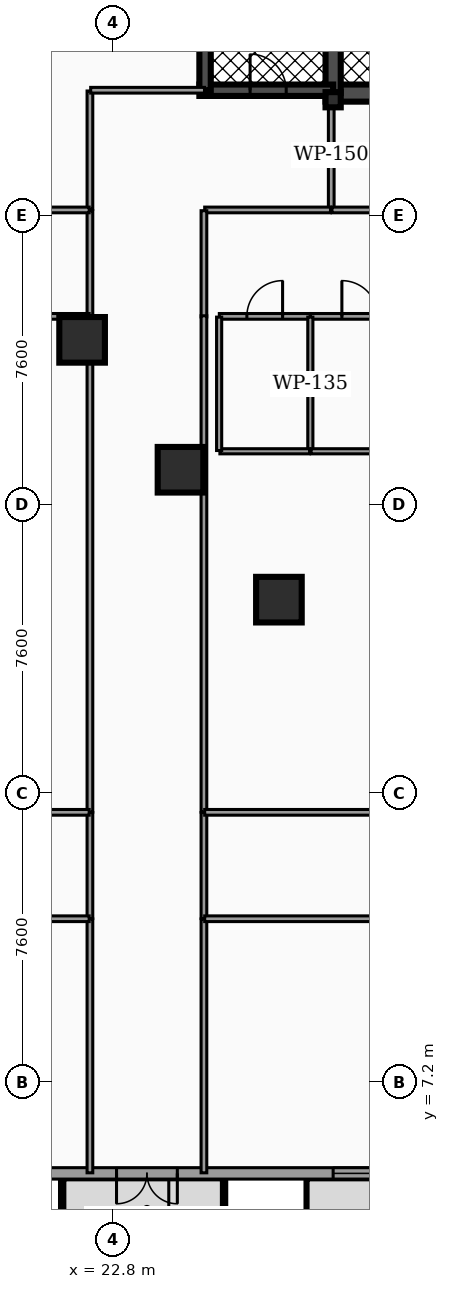
"""IFC4 building model, lengths in metres.
Left out: names, types, materials, properties, quantities, classifications, styles, units other than length and angle.
Written with IfcOpenShell. Run it as: python <this file> out.ifc"""

import sys

from ifc_helpers import new_model, si_unit, direction, frame, frame_2d, origin, origin_2d, place, context, subcontext, project, spatial, rectangle, hollow_rectangle, extrude, element, fill, save


model = new_model("IFC4")
c1 = context("Model", 3, precision=1e-05, world=origin(), true_north=direction((0.0, 1.0)))
c2 = subcontext(c1, "Body", "Model", "MODEL_VIEW")
j1 = project(units=[si_unit("LENGTHUNIT", "METRE"), si_unit("PLANEANGLEUNIT", "RADIAN")], contexts=[c1])
p1 = place(None, origin())
s1 = spatial("IfcSite", under=j1, at=p1, CompositionType="ELEMENT")
p2 = place(p1, origin())
s2 = spatial("IfcBuilding", under=s1, at=p2, CompositionType="ELEMENT")
p3 = place(p2, origin())
s3 = spatial("IfcBuildingStorey", under=s2, at=p3, CompositionType="ELEMENT", Elevation=0.0)
p4 = place(p3, frame((28.4, 33.225, 0.0), z_axis=(0.0, 0.0, 1.0), x_axis=(1.0, 0.0, 0.0)))
e1 = element("IfcWall", 1, at=p4, inside=s3, PredefinedType="SHEAR", context=c2, shape_type="SweptSolid", body=[
    extrude(rectangle(XDim=20.11, YDim=0.45, at=frame_2d((10.055, 0.0))), origin(), (0.0, 0.0, 1.0), 4.82),
])
p5 = place(p4, frame((4.03, 0.0, 0.0)))
e2 = element("IfcOpeningElement", 2, at=p5, cuts=e1, PredefinedType="OPENING", context=c2, shape_type="SweptSolid", body=[
    extrude(rectangle(XDim=1.1, YDim=2.15, at=frame_2d((0.55, 1.075))), frame((0.0, 0.235, 0.0), z_axis=(0.0, -1.0, 0.0), x_axis=(1.0, 0.0, 0.0)), (0.0, 0.0, 1.0), 0.47),
])
p6 = place(p4, frame((14.87, 0.0, 0.0)))
e3 = element("IfcOpeningElement", 3, at=p6, cuts=e1, PredefinedType="OPENING", context=c2, shape_type="SweptSolid", body=[
    extrude(rectangle(XDim=1.1, YDim=2.15, at=frame_2d((0.55, 1.075))), frame((0.0, 0.235, 0.0), z_axis=(0.0, -1.0, 0.0), x_axis=(1.0, 0.0, 0.0)), (0.0, 0.0, 1.0), 0.47),
])
p7 = place(p4, frame((5.95, 0.0, 0.0)))
e4 = element("IfcOpeningElement", 4, at=p7, cuts=e1, PredefinedType="OPENING", context=c2, shape_type="SweptSolid", body=[
    extrude(rectangle(XDim=1.0, YDim=2.1, at=frame_2d((0.5, 1.05))), frame((0.0, 0.235, 0.0), z_axis=(0.0, -1.0, 0.0), x_axis=(1.0, 0.0, 0.0)), (0.0, 0.0, 1.0), 0.47),
])
p8 = place(p4, frame((7.65, 0.0, 0.0)))
e5 = element("IfcOpeningElement", 5, at=p8, cuts=e1, PredefinedType="OPENING", context=c2, shape_type="SweptSolid", body=[
    extrude(rectangle(XDim=1.0, YDim=2.1, at=frame_2d((0.5, 1.05))), frame((0.0, 0.235, 0.0), z_axis=(0.0, -1.0, 0.0), x_axis=(1.0, 0.0, 0.0)), (0.0, 0.0, 1.0), 0.47),
])
p9 = place(p4, frame((11.35, 0.0, 0.0)))
e6 = element("IfcOpeningElement", 6, at=p9, cuts=e1, PredefinedType="OPENING", context=c2, shape_type="SweptSolid", body=[
    extrude(rectangle(XDim=1.0, YDim=2.1, at=frame_2d((0.5, 1.05))), frame((0.0, 0.235, 0.0), z_axis=(0.0, -1.0, 0.0), x_axis=(1.0, 0.0, 0.0)), (0.0, 0.0, 1.0), 0.47),
])
p10 = place(p4, frame((13.05, 0.0, 0.0)))
e7 = element("IfcOpeningElement", 7, at=p10, cuts=e1, PredefinedType="OPENING", context=c2, shape_type="SweptSolid", body=[
    extrude(rectangle(XDim=1.0, YDim=2.1, at=frame_2d((0.5, 1.05))), frame((0.0, 0.235, 0.0), z_axis=(0.0, -1.0, 0.0), x_axis=(1.0, 0.0, 0.0)), (0.0, 0.0, 1.0), 0.47),
])
p11 = place(p4, frame((1.31, 0.0, 0.0)))
e8 = element("IfcOpeningElement", 8, at=p11, cuts=e1, PredefinedType="OPENING", context=c2, shape_type="SweptSolid", body=[
    extrude(rectangle(XDim=1.1, YDim=2.2, at=frame_2d((0.55, 1.1))), frame((0.0, 0.235, 0.0), z_axis=(0.0, -1.0, 0.0), x_axis=(1.0, 0.0, 0.0)), (0.0, 0.0, 1.0), 0.47),
])
p12 = place(p4, frame((9.44, 0.0, 0.0)))
e9 = element("IfcOpeningElement", 9, at=p12, cuts=e1, PredefinedType="OPENING", context=c2, shape_type="SweptSolid", body=[
    extrude(rectangle(XDim=1.12, YDim=2.05, at=frame_2d((0.56, 1.025))), frame((0.0, 0.235, 0.0), z_axis=(0.0, -1.0, 0.0), x_axis=(1.0, 0.0, 0.0)), (0.0, 0.0, 1.0), 0.47),
])
p13 = place(p4, frame((17.65, 0.0, 0.0)))
e10 = element("IfcOpeningElement", 10, at=p13, cuts=e1, PredefinedType="OPENING", context=c2, shape_type="SweptSolid", body=[
    extrude(rectangle(XDim=1.1, YDim=2.2, at=frame_2d((0.55, 1.1))), frame((0.0, 0.235, 0.0), z_axis=(0.0, -1.0, 0.0), x_axis=(1.0, 0.0, 0.0)), (0.0, 0.0, 1.0), 0.47),
])
p14 = place(p3, frame((28.6, 33.225, 0.0), z_axis=(0.0, 0.0, 1.0), x_axis=(0.0, 1.0, 0.0)))
e11 = element("IfcWall", 11, at=p14, inside=s3, PredefinedType="SHEAR", context=c2, shape_type="SweptSolid", body=[
    extrude(rectangle(XDim=10.25, YDim=0.4, at=frame_2d((5.125, 0.0))), origin(), (0.0, 0.0, 1.0), 4.82),
])
p15 = place(p3, frame((25.08, 33.3, 0.0), z_axis=(0.0, 0.0, 1.0), x_axis=(1.0, 0.0, 0.0)))
e12 = element("IfcWall", 12, at=p15, inside=s3, PredefinedType="SHEAR", context=c2, shape_type="SweptSolid", body=[
    extrude(rectangle(XDim=3.52, YDim=0.3, at=frame_2d((1.76, 0.0))), origin(), (0.0, 0.0, 1.0), 4.82),
])
p16 = place(p15, frame((1.335, 0.0, 0.0)))
e13 = element("IfcOpeningElement", 13, at=p16, cuts=e12, PredefinedType="OPENING", context=c2, shape_type="SweptSolid", body=[
    extrude(rectangle(XDim=0.95, YDim=2.2, at=frame_2d((0.475, 1.1))), frame((0.0, 0.16, 0.0), z_axis=(0.0, -1.0, 0.0), x_axis=(1.0, 0.0, 0.0)), (0.0, 0.0, 1.0), 0.32),
])
p17 = place(p3, frame((25.23, 33.3, 0.0), z_axis=(0.0, 0.0, 1.0), x_axis=(0.0, 1.0, 0.0)))
e14 = element("IfcWall", 14, at=p17, inside=s3, PredefinedType="SHEAR", context=c2, shape_type="SweptSolid", body=[
    extrude(rectangle(XDim=7.6, YDim=0.3, at=frame_2d((3.8, 0.0))), origin(), (0.0, 0.0, 1.0), 4.82),
])
for number, where, z_axis, x_axis in (
    (15, (21.994, 26.732, 0.0), (0.0, 0.0, 1.0), (1.0, 0.0, 0.0)),
    (16, (24.583, 23.314, 0.0), (0.0, 0.0, 1.0), (1.0, 0.0, 0.0)),
    (17, (27.173, 19.896, 0.0), (0.0, 0.0, 1.0), (1.0, 0.0, 0.0)),
):
    element("IfcColumn", number, at=place(p3, frame(where, z_axis=z_axis, x_axis=x_axis)), inside=s3, PredefinedType="COLUMN", context=c2, shape_type="SweptSolid", body=[
        extrude(hollow_rectangle(XDim=1.2, YDim=1.2, WallThickness=0.06, at=origin_2d()), origin(), (0.0, 0.0, 1.0), 4.82),
    ])
p18 = place(p3, frame((28.6, 33.05, 0.0), z_axis=(0.0, 0.0, 1.0), x_axis=(1.0, 0.0, 0.0)))
e18 = element("IfcColumn", 18, at=p18, inside=s3, PredefinedType="PILASTER", context=c2, shape_type="SweptSolid", body=[
    extrude(hollow_rectangle(XDim=0.4, YDim=0.4, WallThickness=0.02, at=origin_2d()), origin(), (0.0, 0.0, 1.0), 4.82),
])
p19 = place(p3, frame((75.1, 4.8, 0.0), z_axis=(0.0, 0.0, 1.0), x_axis=(-1.0, 0.0, 0.0)))
e19 = element("IfcWall", 19, at=p19, inside=s3, PredefinedType="STANDARD", context=c2, shape_type="SweptSolid", body=[
    extrude(rectangle(XDim=73.4, YDim=0.3, at=frame_2d((36.7, 0.0))), origin(), (0.0, 0.0, 1.0), 4.205),
])
p20 = place(p19, frame((65.3, 0.0, 0.0)))
e20 = element("IfcOpeningElement", 20, at=p20, cuts=e19, PredefinedType="OPENING", context=c2, shape_type="SweptSolid", body=[
    extrude(rectangle(XDim=4.4, YDim=3.5, at=frame_2d((2.2, 1.75))), frame((0.0, 0.16, 0.0), z_axis=(0.0, -1.0, 0.0), x_axis=(1.0, 0.0, 0.0)), (0.0, 0.0, 1.0), 0.32),
])
p21 = place(p19, frame((31.15, 0.0, 0.0)))
e21 = element("IfcOpeningElement", 21, at=p21, cuts=e19, PredefinedType="OPENING", context=c2, shape_type="SweptSolid", body=[
    extrude(rectangle(XDim=2.4, YDim=2.6, at=frame_2d((1.2, 1.3))), frame((0.0, 0.16, 0.0), z_axis=(0.0, -1.0, 0.0), x_axis=(1.0, 0.0, 0.0)), (0.0, 0.0, 1.0), 0.32),
])
p22 = place(p19, frame((50.6, 0.0, 0.0)))
e22 = element("IfcOpeningElement", 22, at=p22, cuts=e19, PredefinedType="OPENING", context=c2, shape_type="SweptSolid", body=[
    extrude(rectangle(XDim=1.6, YDim=2.4, at=frame_2d((0.8, 1.2))), frame((0.0, 0.16, 0.0), z_axis=(0.0, -1.0, 0.0), x_axis=(1.0, 0.0, 0.0)), (0.0, 0.0, 1.0), 0.32),
])
p23 = place(p19, frame((23.0, 0.0, 0.0)))
e23 = element("IfcOpeningElement", 23, at=p23, cuts=e19, PredefinedType="OPENING", context=c2, shape_type="SweptSolid", body=[
    extrude(rectangle(XDim=1.6, YDim=2.4, at=frame_2d((0.8, 1.2))), frame((0.0, 0.16, 0.0), z_axis=(0.0, -1.0, 0.0), x_axis=(1.0, 0.0, 0.0)), (0.0, 0.0, 1.0), 0.32),
])
p24 = place(p19, frame((7.6, 0.0, 0.0)))
e24 = element("IfcOpeningElement", 24, at=p24, cuts=e19, PredefinedType="OPENING", context=c2, shape_type="SweptSolid", body=[
    extrude(rectangle(XDim=1.8, YDim=2.4, at=frame_2d((0.9, 1.2))), frame((0.0, 0.16, 0.0), z_axis=(0.0, -1.0, 0.0), x_axis=(1.0, 0.0, 0.0)), (0.0, 0.0, 1.0), 0.32),
])
p25 = place(p19, frame((17.1, 0.0, 0.0)))
e25 = element("IfcOpeningElement", 25, at=p25, cuts=e19, PredefinedType="OPENING", context=c2, shape_type="SweptSolid", body=[
    extrude(rectangle(XDim=1.8, YDim=2.4, at=frame_2d((0.9, 1.2))), frame((0.0, 0.16, 0.0), z_axis=(0.0, -1.0, 0.0), x_axis=(1.0, 0.0, 0.0)), (0.0, 0.0, 1.0), 0.32),
])
p26 = place(p19, frame((59.75, 0.0, 0.0)))
e26 = element("IfcOpeningElement", 26, at=p26, cuts=e19, PredefinedType="OPENING", context=c2, shape_type="SweptSolid", body=[
    extrude(rectangle(XDim=1.8, YDim=2.4, at=frame_2d((0.9, 1.2))), frame((0.0, 0.16, 0.0), z_axis=(0.0, -1.0, 0.0), x_axis=(1.0, 0.0, 0.0)), (0.0, 0.0, 1.0), 0.32),
])
p27 = place(p19, frame((13.6, 0.0, 0.9)))
e27 = element("IfcOpeningElement", 27, at=p27, cuts=e19, PredefinedType="OPENING", context=c2, shape_type="SweptSolid", body=[
    extrude(rectangle(XDim=2.4, YDim=2.5, at=frame_2d((1.2, 1.25))), frame((0.0, 0.16, 0.0), z_axis=(0.0, -1.0, 0.0), x_axis=(1.0, 0.0, 0.0)), (0.0, 0.0, 1.0), 0.32),
])
p28 = place(p19, frame((28.15, 0.0, 0.9)))
e28 = element("IfcOpeningElement", 28, at=p28, cuts=e19, PredefinedType="OPENING", context=c2, shape_type="SweptSolid", body=[
    extrude(rectangle(XDim=2.4, YDim=2.5, at=frame_2d((1.2, 1.25))), frame((0.0, 0.16, 0.0), z_axis=(0.0, -1.0, 0.0), x_axis=(1.0, 0.0, 0.0)), (0.0, 0.0, 1.0), 0.32),
])
p29 = place(p19, frame((44.1, 0.0, 0.9)))
e29 = element("IfcOpeningElement", 29, at=p29, cuts=e19, PredefinedType="OPENING", context=c2, shape_type="SweptSolid", body=[
    extrude(rectangle(XDim=2.4, YDim=2.5, at=frame_2d((1.2, 1.25))), frame((0.0, 0.16, 0.0), z_axis=(0.0, -1.0, 0.0), x_axis=(1.0, 0.0, 0.0)), (0.0, 0.0, 1.0), 0.32),
])
p30 = place(p3, frame((28.55, 30.17, 0.0), z_axis=(0.0, 0.0, 1.0), x_axis=(0.0, 1.0, 0.0)))
e30 = element("IfcWall", 30, at=p30, inside=s3, PredefinedType="PARTITIONING", context=c2, shape_type="SweptSolid", body=[
    extrude(rectangle(XDim=2.862, YDim=0.15, at=frame_2d((1.431, 0.0))), origin(), (0.0, 0.0, 1.0), 3.777),
])
p31 = place(p3, frame((41.995, 30.15, 0.0), z_axis=(0.0, 0.0, 1.0), x_axis=(-1.0, 0.0, 0.0)))
e31 = element("IfcWall", 31, at=p31, inside=s3, PredefinedType="PARTITIONING", context=c2, shape_type="SweptSolid", body=[
    extrude(rectangle(XDim=13.425, YDim=0.15, at=frame_2d((6.712, 0.0))), origin(), (0.0, 0.0, 1.0), 3.777),
])
p32 = place(p31, frame((6.242, 0.0, 0.0)))
e32 = element("IfcOpeningElement", 32, at=p32, cuts=e31, PredefinedType="OPENING", context=c2, shape_type="SweptSolid", body=[
    extrude(rectangle(XDim=0.94, YDim=2.05, at=frame_2d((0.47, 1.025))), frame((0.0, 0.085, 0.0), z_axis=(0.0, -1.0, 0.0), x_axis=(1.0, 0.0, 0.0)), (0.0, 0.0, 1.0), 0.17),
])
p33 = place(p3, frame((22.2, 11.505, 0.0), z_axis=(0.0, 0.0, 1.0), x_axis=(0.0, 1.0, 0.0)))
e33 = element("IfcWall", 33, at=p33, inside=s3, PredefinedType="PARTITIONING", context=c2, shape_type="SweptSolid", body=[
    extrude(rectangle(XDim=2.79, YDim=0.15, at=frame_2d((1.395, 0.0))), origin(), (0.0, 0.0, 1.0), 3.777),
])
p34 = place(p3, frame((22.2, 27.355, 0.0), z_axis=(0.0, 0.0, 1.0), x_axis=(0.0, 1.0, 0.0)))
e34 = element("IfcWall", 34, at=p34, inside=s3, PredefinedType="PARTITIONING", context=c2, shape_type="SweptSolid", body=[
    extrude(rectangle(XDim=2.775, YDim=0.15, at=frame_2d((1.387, 0.0))), origin(), (0.0, 0.0, 1.0), 3.777),
])
p35 = place(p3, frame((25.22, 30.15, 0.0), z_axis=(0.0, 0.0, 1.0), x_axis=(1.0, 0.0, 0.0)))
e35 = element("IfcWall", 35, at=p35, inside=s3, PredefinedType="PARTITIONING", context=c2, shape_type="SweptSolid", body=[
    extrude(rectangle(XDim=3.31, YDim=0.15, at=frame_2d((1.655, 0.0))), origin(), (0.0, 0.0, 1.0), 3.777),
])
p36 = place(p3, frame((25.2, 27.335, 0.0), z_axis=(0.0, 0.0, 1.0), x_axis=(0.0, 1.0, 0.0)))
e36 = element("IfcWall", 36, at=p36, inside=s3, PredefinedType="PARTITIONING", context=c2, shape_type="SweptSolid", body=[
    extrude(rectangle(XDim=2.795, YDim=0.15, at=frame_2d((1.397, 0.0))), origin(), (0.0, 0.0, 1.0), 3.777),
])
p37 = place(p3, frame((25.2, 11.505, 0.0), z_axis=(0.0, 0.0, 1.0), x_axis=(0.0, 1.0, 0.0)))
e37 = element("IfcWall", 37, at=p37, inside=s3, PredefinedType="PARTITIONING", context=c2, shape_type="SweptSolid", body=[
    extrude(rectangle(XDim=2.79, YDim=0.15, at=frame_2d((1.395, 0.0))), origin(), (0.0, 0.0, 1.0), 3.777),
])
p38 = place(p3, frame((22.2, 30.17, 0.0), z_axis=(0.0, 0.0, 1.0), x_axis=(0.0, 1.0, 0.0)))
e38 = element("IfcWall", 38, at=p38, inside=s3, PredefinedType="PARTITIONING", context=c2, shape_type="SweptSolid", body=[
    extrude(rectangle(XDim=3.11, YDim=0.15, at=frame_2d((1.555, 0.0))), origin(), (0.0, 0.0, 1.0), 3.777),
])
p39 = place(p3, frame((22.22, 33.3, 0.0), z_axis=(0.0, 0.0, 1.0), x_axis=(1.0, 0.0, 0.0)))
e39 = element("IfcWall", 39, at=p39, inside=s3, PredefinedType="PARTITIONING", context=c2, shape_type="SweptSolid", body=[
    extrude(rectangle(XDim=2.995, YDim=0.15, at=frame_2d((1.498, 0.0))), origin(), (0.0, 0.0, 1.0), 3.777),
])
p40 = place(p3, frame((22.2, 14.305, 0.0), z_axis=(0.0, 0.0, 1.0), x_axis=(0.0, 1.0, 0.0)))
e40 = element("IfcWall", 40, at=p40, inside=s3, PredefinedType="PARTITIONING", context=c2, shape_type="SweptSolid", body=[
    extrude(rectangle(XDim=13.04, YDim=0.15, at=frame_2d((6.52, 0.0))), origin(), (0.0, 0.0, 1.0), 3.777),
])
for number, where, z_axis, x_axis in (
    (41, (22.2, 4.815, 0.0), (0.0, 0.0, 1.0), (0.0, 1.0, 0.0)),
    (42, (25.2, 4.815, 0.0), (0.0, 0.0, 1.0), (0.0, 1.0, 0.0)),
):
    element("IfcWall", number, at=place(p3, frame(where, z_axis=z_axis, x_axis=x_axis)), inside=s3, PredefinedType="PARTITIONING", context=c2, shape_type="SweptSolid", body=[
        extrude(rectangle(XDim=6.68, YDim=0.15, at=frame_2d((3.34, 0.0))), origin(), (0.0, 0.0, 1.0), 3.777),
    ])
p41 = place(p3, frame((25.2, 14.305, 0.0), z_axis=(0.0, 0.0, 1.0), x_axis=(0.0, 1.0, 0.0)))
e43 = element("IfcWall", 43, at=p41, inside=s3, PredefinedType="PARTITIONING", context=c2, shape_type="SweptSolid", body=[
    extrude(rectangle(XDim=13.06, YDim=0.15, at=frame_2d((6.53, 0.0))), origin(), (0.0, 0.0, 1.0), 3.777),
])
for number, where, z_axis, x_axis in (
    (44, (18.22, 30.15, 0.0), (0.0, 0.0, 1.0), (1.0, 0.0, 0.0)),
    (45, (18.22, 27.35, 0.0), (0.0, 0.0, 1.0), (1.0, 0.0, 0.0)),
    (46, (18.22, 14.3, 0.0), (0.0, 0.0, 1.0), (1.0, 0.0, 0.0)),
):
    element("IfcWall", number, at=place(p3, frame(where, z_axis=z_axis, x_axis=x_axis)), inside=s3, PredefinedType="PARTITIONING", context=c2, shape_type="SweptSolid", body=[
        extrude(rectangle(XDim=3.96, YDim=0.15, at=frame_2d((1.98, 0.0))), origin(), (0.0, 0.0, 1.0), 3.777),
    ])
p42 = place(p3, frame((18.2, 11.5, 0.0), z_axis=(0.0, 0.0, 1.0), x_axis=(1.0, 0.0, 0.0)))
e47 = element("IfcWall", 47, at=p42, inside=s3, PredefinedType="PARTITIONING", context=c2, shape_type="SweptSolid", body=[
    extrude(rectangle(XDim=3.98, YDim=0.15, at=frame_2d((1.99, 0.0))), origin(), (0.0, 0.0, 1.0), 3.777),
])
p43 = place(p42, frame((1.52, 0.0, 0.0)))
e48 = element("IfcOpeningElement", 48, at=p43, cuts=e47, PredefinedType="OPENING", context=c2, shape_type="SweptSolid", body=[
    extrude(rectangle(XDim=0.94, YDim=2.05, at=frame_2d((0.47, 1.025))), frame((0.0, 0.085, 0.0), z_axis=(0.0, -1.0, 0.0), x_axis=(1.0, 0.0, 0.0)), (0.0, 0.0, 1.0), 0.17),
])
p44 = place(p3, frame((25.605, 27.35, 0.0), z_axis=(0.0, 0.0, 1.0), x_axis=(1.0, 0.0, 0.0)))
e49 = element("IfcWall", 49, at=p44, inside=s3, PredefinedType="PARTITIONING", context=c2, shape_type="SweptSolid", body=[
    extrude(rectangle(XDim=2.39, YDim=0.15, at=frame_2d((1.195, 0.0))), origin(), (0.0, 0.0, 1.0), 3.777),
])
p45 = place(p44, frame((0.725, 0.0, 0.0)))
e50 = element("IfcOpeningElement", 50, at=p45, cuts=e49, PredefinedType="OPENING", context=c2, shape_type="SweptSolid", body=[
    extrude(rectangle(XDim=0.94, YDim=2.05, at=frame_2d((0.47, 1.025))), frame((0.0, 0.085, 0.0), z_axis=(0.0, -1.0, 0.0), x_axis=(1.0, 0.0, 0.0)), (0.0, 0.0, 1.0), 0.17),
])
p46 = place(p3, frame((28.005, 27.35, 0.0), z_axis=(0.0, 0.0, 1.0), x_axis=(1.0, 0.0, 0.0)))
e51 = element("IfcWall", 51, at=p46, inside=s3, PredefinedType="PARTITIONING", context=c2, shape_type="SweptSolid", body=[
    extrude(rectangle(XDim=2.59, YDim=0.15, at=frame_2d((1.295, 0.0))), origin(), (0.0, 0.0, 1.0), 3.777),
])
p47 = place(p46, frame((0.825, 0.0, 0.0)))
e52 = element("IfcOpeningElement", 52, at=p47, cuts=e51, PredefinedType="OPENING", context=c2, shape_type="SweptSolid", body=[
    extrude(rectangle(XDim=0.94, YDim=2.05, at=frame_2d((0.47, 1.025))), frame((0.0, 0.085, 0.0), z_axis=(0.0, -1.0, 0.0), x_axis=(1.0, 0.0, 0.0)), (0.0, 0.0, 1.0), 0.17),
])
p48 = place(p3, frame((25.22, 11.5, 0.0), z_axis=(0.0, 0.0, 1.0), x_axis=(1.0, 0.0, 0.0)))
e53 = element("IfcWall", 53, at=p48, inside=s3, PredefinedType="PARTITIONING", context=c2, shape_type="SweptSolid", body=[
    extrude(rectangle(XDim=11.76, YDim=0.15, at=frame_2d((5.88, 0.0))), origin(), (0.0, 0.0, 1.0), 3.777),
])
p49 = place(p48, frame((5.41, 0.0, 0.0)))
e54 = element("IfcOpeningElement", 54, at=p49, cuts=e53, PredefinedType="OPENING", context=c2, shape_type="SweptSolid", body=[
    extrude(rectangle(XDim=0.94, YDim=2.05, at=frame_2d((0.47, 1.025))), frame((0.0, 0.085, 0.0), z_axis=(0.0, -1.0, 0.0), x_axis=(1.0, 0.0, 0.0)), (0.0, 0.0, 1.0), 0.17),
])
p50 = place(p3, frame((25.22, 14.3, 0.0), z_axis=(0.0, 0.0, 1.0), x_axis=(1.0, 0.0, 0.0)))
e55 = element("IfcWall", 55, at=p50, inside=s3, PredefinedType="PARTITIONING", context=c2, shape_type="SweptSolid", body=[
    extrude(rectangle(XDim=11.76, YDim=0.15, at=frame_2d((5.88, 0.0))), origin(), (0.0, 0.0, 1.0), 3.777),
])
p51 = place(p3, frame((28.0, 23.82, 0.0), z_axis=(0.0, 0.0, 1.0), x_axis=(0.0, 1.0, 0.0)))
e56 = element("IfcWall", 56, at=p51, inside=s3, PredefinedType="PARTITIONING", context=c2, shape_type="SweptSolid", body=[
    extrude(rectangle(XDim=3.51, YDim=0.135, at=frame_2d((1.755, 0.0))), origin(), (0.0, 0.0, 1.0), 3.777),
])
p52 = place(p3, frame((25.62, 23.8, 0.0), z_axis=(0.0, 0.0, 1.0), x_axis=(1.0, 0.0, 0.0)))
e57 = element("IfcWall", 57, at=p52, inside=s3, PredefinedType="PARTITIONING", context=c2, shape_type="SweptSolid", body=[
    extrude(rectangle(XDim=2.36, YDim=0.135, at=frame_2d((1.18, 0.0))), origin(), (0.0, 0.0, 1.0), 3.777),
])
p53 = place(p3, frame((25.6, 23.82, 0.0), z_axis=(0.0, 0.0, 1.0), x_axis=(0.0, 1.0, 0.0)))
e58 = element("IfcWall", 58, at=p53, inside=s3, PredefinedType="PARTITIONING", context=c2, shape_type="SweptSolid", body=[
    extrude(rectangle(XDim=3.51, YDim=0.135, at=frame_2d((1.755, 0.0))), origin(), (0.0, 0.0, 1.0), 3.777),
])
p54 = place(p3, frame((28.02, 23.8, 0.0), z_axis=(0.0, 0.0, 1.0), x_axis=(1.0, 0.0, 0.0)))
e59 = element("IfcWall", 59, at=p54, inside=s3, PredefinedType="PARTITIONING", context=c2, shape_type="SweptSolid", body=[
    extrude(rectangle(XDim=2.56, YDim=0.135, at=frame_2d((1.28, 0.0))), origin(), (0.0, 0.0, 1.0), 3.777),
])
p55 = place(p22, origin())
e60 = element("IfcDoor", 60, at=p55, inside=s3, OperationType="DOUBLE_DOOR_SINGLE_SWING", PredefinedType="DOOR", context=c2, shape_type="SweptSolid", body=[
    extrude(rectangle(XDim=1.6, YDim=2.4, at=frame_2d((0.8, 1.2))), frame((0.0, 0.025, 0.0), z_axis=(0.0, -1.0, 0.0), x_axis=(1.0, 0.0, 0.0)), (0.0, 0.0, 1.0), 0.05),
])
fill(e22, e60)
p56 = place(p29, origin())
e61 = element("IfcWindow", 61, at=p56, inside=s3, PartitioningType="SINGLE_PANEL", PredefinedType="WINDOW", context=c2, shape_type="SweptSolid", body=[
    extrude(rectangle(XDim=2.4, YDim=2.5, at=frame_2d((1.2, 1.25))), frame((0.0, 0.03, 0.0), z_axis=(0.0, -1.0, 0.0), x_axis=(1.0, 0.0, 0.0)), (0.0, 0.0, 1.0), 0.06),
])
fill(e29, e61)
p57 = place(p16, origin())
e62 = element("IfcDoor", 62, at=p57, inside=s3, OperationType="SINGLE_SWING_LEFT", PredefinedType="DOOR", context=c2, shape_type="SweptSolid", body=[
    extrude(rectangle(XDim=0.95, YDim=2.2, at=frame_2d((0.475, 1.1))), frame((0.0, 0.025, 0.0), z_axis=(0.0, -1.0, 0.0), x_axis=(1.0, 0.0, 0.0)), (0.0, 0.0, 1.0), 0.05),
])
fill(e13, e62)
p58 = place(p45, origin())
e63 = element("IfcDoor", 63, at=p58, inside=s3, OperationType="SINGLE_SWING_RIGHT", PredefinedType="DOOR", context=c2, shape_type="SweptSolid", body=[
    extrude(rectangle(XDim=0.94, YDim=2.05, at=frame_2d((0.47, 1.025))), frame((0.0, 0.025, 0.0), z_axis=(0.0, -1.0, 0.0), x_axis=(1.0, 0.0, 0.0)), (0.0, 0.0, 1.0), 0.05),
])
fill(e50, e63)
p59 = place(p47, origin())
e64 = element("IfcDoor", 64, at=p59, inside=s3, OperationType="SINGLE_SWING_LEFT", PredefinedType="DOOR", context=c2, shape_type="SweptSolid", body=[
    extrude(rectangle(XDim=0.94, YDim=2.05, at=frame_2d((0.47, 1.025))), frame((0.0, 0.025, 0.0), z_axis=(0.0, -1.0, 0.0), x_axis=(1.0, 0.0, 0.0)), (0.0, 0.0, 1.0), 0.05),
])
fill(e52, e64)
save(model, sys.argv[1])
